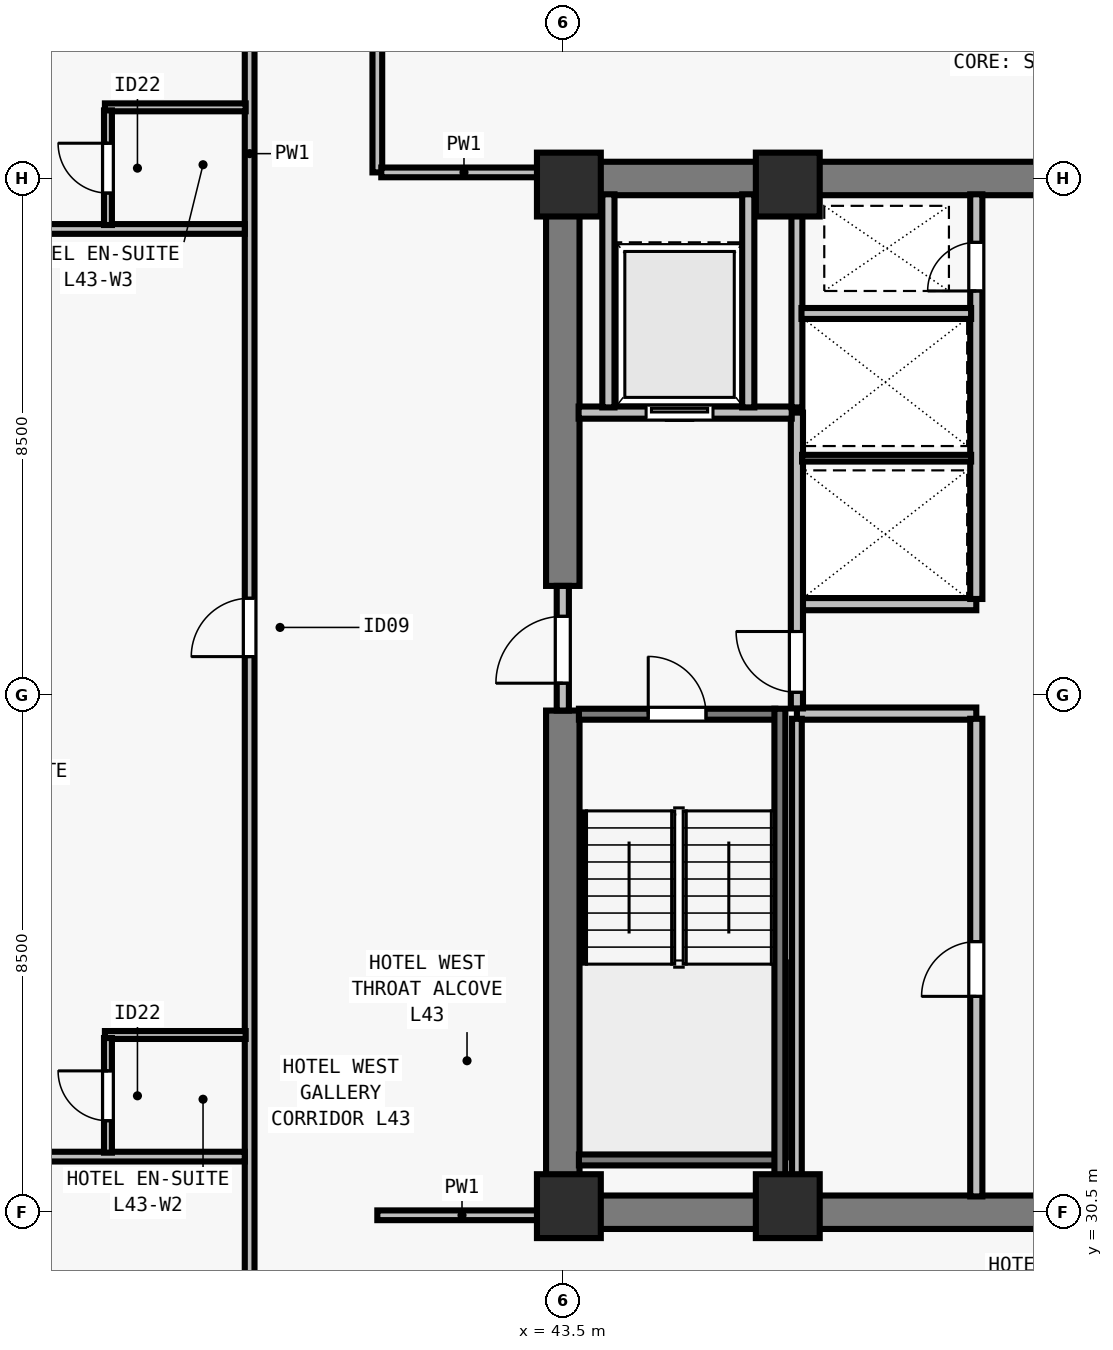
"""IFC4 building model, lengths in metres.
Left out: names, types, materials, properties, quantities, classifications, styles, units other than length and angle.
Written with IfcOpenShell. Run it as: python <this file> out.ifc"""

import sys

from ifc_helpers import new_model, si_unit, direction, frame, frame_2d, origin, origin_2d, place, context, subcontext, project, spatial, rectangle, extrude, element, fill, save


model = new_model("IFC4")
c1 = context("Model", 3, precision=1e-05, world=origin(), true_north=direction((0.0, 1.0)))
c2 = subcontext(c1, "Body", "Model", "MODEL_VIEW")
j1 = project(units=[si_unit("LENGTHUNIT", "METRE"), si_unit("PLANEANGLEUNIT", "RADIAN")], contexts=[c1])
p1 = place(None, origin())
s1 = spatial("IfcSite", under=j1, at=p1, CompositionType="ELEMENT")
p2 = place(p1, origin())
s2 = spatial("IfcBuilding", under=s1, at=p2, CompositionType="ELEMENT")
p3 = place(p2, frame((0.0, 0.0, 158.5)))
s3 = spatial("IfcBuildingStorey", under=s2, at=p3, CompositionType="ELEMENT", Elevation=158.5)
for number, where, z_axis, x_axis in (
    (1, (43.6, 30.6, 0.0), (0.0, 0.0, 1.0), (1.0, 0.0, 0.0)),
    (2, (47.2, 30.6, 0.0), (0.0, 0.0, 1.0), (1.0, 0.0, 0.0)),
    (3, (43.6, 47.4, 0.0), (0.0, 0.0, 1.0), (1.0, 0.0, 0.0)),
    (4, (47.2, 47.4, 0.0), (0.0, 0.0, 1.0), (1.0, 0.0, 0.0)),
):
    element("IfcColumn", number, at=place(p3, frame(where, z_axis=z_axis, x_axis=x_axis)), inside=s3, PredefinedType="COLUMN", context=c2, shape_type="SweptSolid", body=[
        extrude(rectangle(XDim=1.05, YDim=1.05, at=origin_2d()), origin(), (0.0, 0.0, 1.0), 3.5),
    ])
for number, where, z_axis, x_axis in (
    (5, (43.225, 30.5, 0.0), (0.0, 0.0, 1.0), (1.0, 0.0, 0.0)),
    (6, (43.225, 47.5, 0.0), (0.0, 0.0, 1.0), (1.0, 0.0, 0.0)),
):
    element("IfcWall", number, at=place(p3, frame(where, z_axis=z_axis, x_axis=x_axis)), inside=s3, PredefinedType="SHEAR", context=c2, shape_type="SweptSolid", body=[
        extrude(rectangle(XDim=17.55, YDim=0.55, at=frame_2d((8.775, 0.0))), origin(), (0.0, 0.0, 1.0), 3.28),
    ])
p4 = place(p3, frame((43.5, 30.765, 0.0), z_axis=(0.0, 0.0, 1.0), x_axis=(0.0, 1.0, 0.0)))
e7 = element("IfcWall", 7, at=p4, inside=s3, PredefinedType="SHEAR", context=c2, shape_type="SweptSolid", body=[
    extrude(rectangle(XDim=7.985, YDim=0.55, at=frame_2d((3.993, 0.0))), origin(), (0.0, 0.0, 1.0), 3.28),
])
p5 = place(p3, frame((43.5, 40.8, 0.0), z_axis=(0.0, 0.0, 1.0), x_axis=(0.0, 1.0, 0.0)))
e8 = element("IfcWall", 8, at=p5, inside=s3, PredefinedType="SHEAR", context=c2, shape_type="SweptSolid", body=[
    extrude(rectangle(XDim=6.435, YDim=0.55, at=frame_2d((3.218, 0.0))), origin(), (0.0, 0.0, 1.0), 3.28),
])
for number, where, z_axis, x_axis in (
    (9, (47.35, 38.7, 0.0), (0.0, 0.0, 1.0), (1.0, 0.0, 0.0)),
    (10, (47.35, 40.5, 0.0), (0.0, 0.0, 1.0), (1.0, 0.0, 0.0)),
):
    element("IfcWall", number, at=place(p3, frame(where, z_axis=z_axis, x_axis=x_axis)), inside=s3, PredefinedType="SOLIDWALL", context=c2, shape_type="SweptSolid", body=[
        extrude(rectangle(XDim=2.95, YDim=0.2, at=frame_2d((1.475, 0.0))), origin(), (0.0, 0.0, 1.0), 3.28),
    ])
p6 = place(p3, frame((50.3, 30.76, 0.0), z_axis=(0.0, 0.0, 1.0), x_axis=(0.0, 1.0, 0.0)))
e11 = element("IfcWall", 11, at=p6, inside=s3, PredefinedType="SOLIDWALL", context=c2, shape_type="SweptSolid", body=[
    extrude(rectangle(XDim=7.855, YDim=0.2, at=frame_2d((3.927, 0.0))), origin(), (0.0, 0.0, 1.0), 3.28),
])
p7 = place(p6, frame((3.29, 0.0, 0.0)))
e12 = element("IfcOpeningElement", 12, at=p7, cuts=e11, PredefinedType="OPENING", context=c2, shape_type="SweptSolid", body=[
    extrude(rectangle(XDim=0.9, YDim=2.12, at=frame_2d((0.45, 1.06))), frame((0.0, 0.11, 0.0), z_axis=(0.0, -1.0, 0.0), x_axis=(1.0, 0.0, 0.0)), (0.0, 0.0, 1.0), 0.22),
])
p8 = place(p3, frame((50.3, 40.585, 0.0), z_axis=(0.0, 0.0, 1.0), x_axis=(0.0, 1.0, 0.0)))
e13 = element("IfcWall", 13, at=p8, inside=s3, PredefinedType="SOLIDWALL", context=c2, shape_type="SweptSolid", body=[
    extrude(rectangle(XDim=6.655, YDim=0.2, at=frame_2d((3.328, 0.0))), origin(), (0.0, 0.0, 1.0), 3.28),
])
p9 = place(p8, frame((5.065, 0.0, 0.0)))
e14 = element("IfcOpeningElement", 14, at=p9, cuts=e13, PredefinedType="OPENING", context=c2, shape_type="SweptSolid", body=[
    extrude(rectangle(XDim=0.8, YDim=2.08, at=frame_2d((0.4, 1.04))), frame((0.0, 0.11, 0.0), z_axis=(0.0, -1.0, 0.0), x_axis=(1.0, 0.0, 0.0)), (0.0, 0.0, 1.0), 0.22),
])
p10 = place(p3, frame((43.5, 38.75, 0.0), z_axis=(0.0, 0.0, 1.0), x_axis=(0.0, 1.0, 0.0)))
e15 = element("IfcWall", 15, at=p10, inside=s3, PredefinedType="SOLIDWALL", context=c2, shape_type="SweptSolid", body=[
    extrude(rectangle(XDim=2.05, YDim=0.2, at=frame_2d((1.025, 0.0))), origin(), (0.0, 0.0, 1.0), 3.28),
])
p11 = place(p10, frame((0.45, 0.0, 0.0)))
e16 = element("IfcOpeningElement", 16, at=p11, cuts=e15, PredefinedType="OPENING", context=c2, shape_type="SweptSolid", body=[
    extrude(rectangle(XDim=1.1, YDim=2.15, at=frame_2d((0.55, 1.075))), frame((0.0, 0.11, 0.0), z_axis=(0.0, -1.0, 0.0), x_axis=(1.0, 0.0, 0.0)), (0.0, 0.0, 1.0), 0.22),
])
p12 = place(p3, frame((47.35, 38.785, 0.0), z_axis=(0.0, 0.0, 1.0), x_axis=(0.0, 1.0, 0.0)))
e17 = element("IfcWall", 17, at=p12, inside=s3, PredefinedType="SOLIDWALL", context=c2, shape_type="SweptSolid", body=[
    extrude(rectangle(XDim=4.865, YDim=0.2, at=frame_2d((2.433, 0.0))), origin(), (0.0, 0.0, 1.0), 3.28),
])
p13 = place(p12, frame((0.265, 0.0, 0.0)))
e18 = element("IfcOpeningElement", 18, at=p13, cuts=e17, PredefinedType="OPENING", context=c2, shape_type="SweptSolid", body=[
    extrude(rectangle(XDim=1.0, YDim=2.15, at=frame_2d((0.5, 1.075))), frame((0.0, 0.11, 0.0), z_axis=(0.0, -1.0, 0.0), x_axis=(1.0, 0.0, 0.0)), (0.0, 0.0, 1.0), 0.22),
])
p14 = place(p3, frame((43.76, 43.65, 0.0), z_axis=(0.0, 0.0, 1.0), x_axis=(1.0, 0.0, 0.0)))
e19 = element("IfcWall", 19, at=p14, inside=s3, PredefinedType="SOLIDWALL", context=c2, shape_type="SweptSolid", body=[
    extrude(rectangle(XDim=3.505, YDim=0.2, at=frame_2d((1.752, 0.0))), origin(), (0.0, 0.0, 1.0), 3.28),
])
p15 = place(p14, frame((1.11, 0.0, 0.0)))
e20 = element("IfcOpeningElement", 20, at=p15, cuts=e19, PredefinedType="OPENING", context=c2, shape_type="SweptSolid", body=[
    extrude(rectangle(XDim=1.1, YDim=2.2, at=frame_2d((0.55, 1.1))), frame((0.0, 0.11, 0.0), z_axis=(0.0, -1.0, 0.0), x_axis=(1.0, 0.0, 0.0)), (0.0, 0.0, 1.0), 0.22),
])
for number, where, z_axis, x_axis in (
    (21, (46.55, 43.735, 0.0), (0.0, 0.0, 1.0), (0.0, 1.0, 0.0)),
    (22, (44.25, 43.735, 0.0), (0.0, 0.0, 1.0), (0.0, 1.0, 0.0)),
):
    element("IfcWall", number, at=place(p3, frame(where, z_axis=z_axis, x_axis=x_axis)), inside=s3, PredefinedType="SOLIDWALL", context=c2, shape_type="SweptSolid", body=[
        extrude(rectangle(XDim=3.505, YDim=0.2, at=frame_2d((1.752, 0.0))), origin(), (0.0, 0.0, 1.0), 3.28),
    ])
p16 = place(p3, frame((47.35, 30.76, 0.0), z_axis=(0.0, 0.0, 1.0), x_axis=(0.0, 1.0, 0.0)))
e23 = element("IfcWall", 23, at=p16, inside=s3, PredefinedType="PARTITIONING", context=c2, shape_type="SweptSolid", body=[
    extrude(rectangle(XDim=7.855, YDim=0.16, at=frame_2d((3.927, 0.0))), origin(), (0.0, 0.0, 1.0), 3.28),
])
p17 = place(p3, frame((47.35, 43.735, 0.0), z_axis=(0.0, 0.0, 1.0), x_axis=(0.0, 1.0, 0.0)))
e24 = element("IfcWall", 24, at=p17, inside=s3, PredefinedType="SOLIDWALL", context=c2, shape_type="SweptSolid", body=[
    extrude(rectangle(XDim=3.505, YDim=0.18, at=frame_2d((1.752, 0.0))), origin(), (0.0, 0.0, 1.0), 3.28),
])
p18 = place(p3, frame((47.435, 42.9, 0.0), z_axis=(0.0, 0.0, 1.0), x_axis=(1.0, 0.0, 0.0)))
e25 = element("IfcWall", 25, at=p18, inside=s3, PredefinedType="PARTITIONING", context=c2, shape_type="SweptSolid", body=[
    extrude(rectangle(XDim=2.78, YDim=0.11, at=frame_2d((1.39, 0.0))), origin(), (0.0, 0.0, 1.0), 3.28),
])
p19 = place(p3, frame((47.425, 45.28, 0.0), z_axis=(0.0, 0.0, 1.0), x_axis=(1.0, 0.0, 0.0)))
e26 = element("IfcWall", 26, at=p19, inside=s3, PredefinedType="SOLIDWALL", context=c2, shape_type="SweptSolid", body=[
    extrude(rectangle(XDim=2.79, YDim=0.18, at=frame_2d((1.395, 0.0))), origin(), (0.0, 0.0, 1.0), 3.28),
])
p20 = place(p3, frame((38.35, 15.325, 0.0), z_axis=(0.0, 0.0, 1.0), x_axis=(0.0, 1.0, 0.0)))
e27 = element("IfcWall", 27, at=p20, inside=s3, PredefinedType="PARTITIONING", context=c2, shape_type="SweptSolid", body=[
    extrude(rectangle(XDim=47.35, YDim=0.16, at=frame_2d((23.675, 0.0))), origin(), (0.0, 0.0, 1.0), 2.555),
])
p21 = place(p20, frame((8.912, 0.0, 0.0)))
e28 = element("IfcOpeningElement", 28, at=p21, cuts=e27, PredefinedType="OPENING", context=c2, shape_type="SweptSolid", body=[
    extrude(rectangle(XDim=0.96, YDim=2.15, at=frame_2d((0.48, 1.075))), frame((0.0, 0.09, 0.0), z_axis=(0.0, -1.0, 0.0), x_axis=(1.0, 0.0, 0.0)), (0.0, 0.0, 1.0), 0.18),
])
p22 = place(p20, frame((24.312, 0.0, 0.0)))
e29 = element("IfcOpeningElement", 29, at=p22, cuts=e27, PredefinedType="OPENING", context=c2, shape_type="SweptSolid", body=[
    extrude(rectangle(XDim=0.96, YDim=2.15, at=frame_2d((0.48, 1.075))), frame((0.0, 0.09, 0.0), z_axis=(0.0, -1.0, 0.0), x_axis=(1.0, 0.0, 0.0)), (0.0, 0.0, 1.0), 0.18),
])
p23 = place(p20, frame((39.895, 0.0, 0.0)))
e30 = element("IfcOpeningElement", 30, at=p23, cuts=e27, PredefinedType="OPENING", context=c2, shape_type="SweptSolid", body=[
    extrude(rectangle(XDim=0.96, YDim=2.15, at=frame_2d((0.48, 1.075))), frame((0.0, 0.09, 0.0), z_axis=(0.0, -1.0, 0.0), x_axis=(1.0, 0.0, 0.0)), (0.0, 0.0, 1.0), 0.18),
])
p24 = place(p3, frame((40.45, 47.6, 0.0), z_axis=(0.0, 0.0, 1.0), x_axis=(0.0, 1.0, 0.0)))
e31 = element("IfcWall", 31, at=p24, inside=s3, PredefinedType="PARTITIONING", context=c2, shape_type="SweptSolid", body=[
    extrude(rectangle(XDim=15.075, YDim=0.16, at=frame_2d((7.538, 0.0))), origin(), (0.0, 0.0, 1.0), 2.555),
])
p25 = place(p24, frame((3.5, 0.0, 0.0)))
e32 = element("IfcOpeningElement", 32, at=p25, cuts=e31, PredefinedType="OPENING", context=c2, shape_type="SweptSolid", body=[
    extrude(rectangle(XDim=0.96, YDim=2.12, at=frame_2d((0.48, 1.06))), frame((0.0, 0.09, 0.0), z_axis=(0.0, -1.0, 0.0), x_axis=(1.0, 0.0, 0.0)), (0.0, 0.0, 1.0), 0.18),
])
p26 = place(p3, frame((40.45, 30.45, 0.0), z_axis=(0.0, 0.0, 1.0), x_axis=(1.0, 0.0, 0.0)))
e33 = element("IfcWall", 33, at=p26, inside=s3, PredefinedType="PARTITIONING", context=c2, shape_type="SweptSolid", body=[
    extrude(rectangle(XDim=2.785, YDim=0.16, at=frame_2d((1.393, 0.0))), origin(), (0.0, 0.0, 1.0), 3.28),
])
p27 = place(p3, frame((40.515, 47.6, 0.0), z_axis=(0.0, 0.0, 1.0), x_axis=(1.0, 0.0, 0.0)))
e34 = element("IfcWall", 34, at=p27, inside=s3, PredefinedType="PARTITIONING", context=c2, shape_type="SweptSolid", body=[
    extrude(rectangle(XDim=2.72, YDim=0.16, at=frame_2d((1.36, 0.0))), origin(), (0.0, 0.0, 1.0), 3.28),
])
p28 = place(p3, frame((28.325, 31.415, 0.0), z_axis=(0.0, 0.0, 1.0), x_axis=(1.0, 0.0, 0.0)))
e35 = element("IfcWall", 35, at=p28, inside=s3, PredefinedType="PARTITIONING", context=c2, shape_type="SweptSolid", body=[
    extrude(rectangle(XDim=9.945, YDim=0.16, at=frame_2d((4.973, 0.0))), origin(), (0.0, 0.0, 1.0), 3.28),
])
p29 = place(p3, frame((35.97, 33.415, 0.0), z_axis=(0.0, 0.0, 1.0), x_axis=(1.0, 0.0, 0.0)))
e36 = element("IfcWall", 36, at=p29, inside=s3, PredefinedType="PLUMBINGWALL", context=c2, shape_type="SweptSolid", body=[
    extrude(rectangle(XDim=2.315, YDim=0.13, at=frame_2d((1.157, 0.0))), origin(), (0.0, 0.0, 1.0), 3.28),
])
p30 = place(p3, frame((36.02, 31.479, 0.0), z_axis=(0.0, 0.0, 1.0), x_axis=(0.0, 1.0, 0.0)))
e37 = element("IfcWall", 37, at=p30, inside=s3, PredefinedType="PLUMBINGWALL", context=c2, shape_type="SweptSolid", body=[
    extrude(rectangle(XDim=1.885, YDim=0.13, at=frame_2d((0.942, 0.0))), origin(), (0.0, 0.0, 1.0), 3.28),
])
p31 = place(p30, frame((0.525, 0.0, 0.0)))
e38 = element("IfcOpeningElement", 38, at=p31, cuts=e37, PredefinedType="OPENING", context=c2, shape_type="SweptSolid", body=[
    extrude(rectangle(XDim=0.82, YDim=2.1, at=frame_2d((0.41, 1.05))), frame((0.0, 0.075, 0.0), z_axis=(0.0, -1.0, 0.0), x_axis=(1.0, 0.0, 0.0)), (0.0, 0.0, 1.0), 0.15),
])
p32 = place(p3, frame((28.325, 46.67, 0.0), z_axis=(0.0, 0.0, 1.0), x_axis=(1.0, 0.0, 0.0)))
e39 = element("IfcWall", 39, at=p32, inside=s3, PredefinedType="PARTITIONING", context=c2, shape_type="SweptSolid", body=[
    extrude(rectangle(XDim=9.945, YDim=0.16, at=frame_2d((4.973, 0.0))), origin(), (0.0, 0.0, 1.0), 3.28),
])
p33 = place(p3, frame((35.97, 48.67, 0.0), z_axis=(0.0, 0.0, 1.0), x_axis=(1.0, 0.0, 0.0)))
e40 = element("IfcWall", 40, at=p33, inside=s3, PredefinedType="PLUMBINGWALL", context=c2, shape_type="SweptSolid", body=[
    extrude(rectangle(XDim=2.315, YDim=0.13, at=frame_2d((1.157, 0.0))), origin(), (0.0, 0.0, 1.0), 3.28),
])
p34 = place(p3, frame((36.02, 46.735, 0.0), z_axis=(0.0, 0.0, 1.0), x_axis=(0.0, 1.0, 0.0)))
e41 = element("IfcWall", 41, at=p34, inside=s3, PredefinedType="PLUMBINGWALL", context=c2, shape_type="SweptSolid", body=[
    extrude(rectangle(XDim=1.885, YDim=0.13, at=frame_2d((0.942, 0.0))), origin(), (0.0, 0.0, 1.0), 3.28),
])
p35 = place(p34, frame((0.525, 0.0, 0.0)))
e42 = element("IfcOpeningElement", 42, at=p35, cuts=e41, PredefinedType="OPENING", context=c2, shape_type="SweptSolid", body=[
    extrude(rectangle(XDim=0.82, YDim=2.1, at=frame_2d((0.41, 1.05))), frame((0.0, 0.075, 0.0), z_axis=(0.0, -1.0, 0.0), x_axis=(1.0, 0.0, 0.0)), (0.0, 0.0, 1.0), 0.15),
])
p36 = place(p3, frame((43.765, 38.69, 0.0), z_axis=(0.0, 0.0, 1.0), x_axis=(1.0, 0.0, 0.0)))
e43 = element("IfcWall", 43, at=p36, inside=s3, PredefinedType="SOLIDWALL", context=c2, shape_type="SweptSolid", body=[
    extrude(rectangle(XDim=3.23, YDim=0.18, at=frame_2d((1.615, 0.0))), origin(), (0.0, 0.0, 1.0), 3.28),
])
p37 = place(p36, frame((1.14, 0.0, 0.0)))
e44 = element("IfcOpeningElement", 44, at=p37, cuts=e43, PredefinedType="OPENING", context=c2, shape_type="SweptSolid", body=[
    extrude(rectangle(XDim=0.95, YDim=2.15, at=frame_2d((0.475, 1.075))), frame((0.0, 0.1, 0.0), z_axis=(0.0, -1.0, 0.0), x_axis=(1.0, 0.0, 0.0)), (0.0, 0.0, 1.0), 0.2),
])
p38 = place(p3, frame((43.765, 31.36, 0.0), z_axis=(0.0, 0.0, 1.0), x_axis=(1.0, 0.0, 0.0)))
e45 = element("IfcWall", 45, at=p38, inside=s3, PredefinedType="SOLIDWALL", context=c2, shape_type="SweptSolid", body=[
    extrude(rectangle(XDim=3.23, YDim=0.18, at=frame_2d((1.615, 0.0))), origin(), (0.0, 0.0, 1.0), 3.28),
])
p39 = place(p3, frame((47.07, 38.78, 0.0), z_axis=(0.0, 0.0, 1.0), x_axis=(0.0, -1.0, 0.0)))
e46 = element("IfcWall", 46, at=p39, inside=s3, PredefinedType="SOLIDWALL", context=c2, shape_type="SweptSolid", body=[
    extrude(rectangle(XDim=8.017, YDim=0.18, at=frame_2d((4.009, 0.0))), origin(), (0.0, 0.0, 1.0), 3.28),
])
p40 = place(p11, origin())
e47 = element("IfcDoor", 47, at=p40, inside=s3, OperationType="SINGLE_SWING_LEFT", PredefinedType="DOOR", context=c2, shape_type="SweptSolid", body=[
    extrude(rectangle(XDim=1.1, YDim=2.15, at=frame_2d((0.55, 1.075))), frame((0.0, 0.025, 0.0), z_axis=(0.0, -1.0, 0.0), x_axis=(1.0, 0.0, 0.0)), (0.0, 0.0, 1.0), 0.05),
])
fill(e16, e47)
p41 = place(p13, origin())
e48 = element("IfcDoor", 48, at=p41, inside=s3, OperationType="SINGLE_SWING_RIGHT", PredefinedType="DOOR", context=c2, shape_type="SweptSolid", body=[
    extrude(rectangle(XDim=1.0, YDim=2.15, at=frame_2d((0.5, 1.075))), frame((0.0, 0.025, 0.0), z_axis=(0.0, -1.0, 0.0), x_axis=(1.0, 0.0, 0.0)), (0.0, 0.0, 1.0), 0.05),
])
fill(e18, e48)
p42 = place(p15, origin())
e49 = element("IfcDoor", 49, at=p42, inside=s3, OperationType="SLIDING_TO_LEFT", PredefinedType="DOOR", context=c2, shape_type="SweptSolid", body=[
    extrude(rectangle(XDim=1.1, YDim=2.2, at=frame_2d((0.55, 1.1))), frame((0.0, 0.025, 0.0), z_axis=(0.0, -1.0, 0.0), x_axis=(1.0, 0.0, 0.0)), (0.0, 0.0, 1.0), 0.05),
])
fill(e20, e49)
p43 = place(p7, origin())
e50 = element("IfcDoor", 50, at=p43, inside=s3, OperationType="SINGLE_SWING_LEFT", PredefinedType="DOOR", context=c2, shape_type="SweptSolid", body=[
    extrude(rectangle(XDim=0.9, YDim=2.12, at=frame_2d((0.45, 1.06))), frame((0.0, 0.025, 0.0), z_axis=(0.0, -1.0, 0.0), x_axis=(1.0, 0.0, 0.0)), (0.0, 0.0, 1.0), 0.05),
])
fill(e12, e50)
p44 = place(p9, origin())
e51 = element("IfcDoor", 51, at=p44, inside=s3, OperationType="SINGLE_SWING_LEFT", PredefinedType="DOOR", context=c2, shape_type="SweptSolid", body=[
    extrude(rectangle(XDim=0.8, YDim=2.08, at=frame_2d((0.4, 1.04))), frame((0.0, 0.025, 0.0), z_axis=(0.0, -1.0, 0.0), x_axis=(1.0, 0.0, 0.0)), (0.0, 0.0, 1.0), 0.05),
])
fill(e14, e51)
p45 = place(p31, origin())
e52 = element("IfcDoor", 52, at=p45, inside=s3, OperationType="SINGLE_SWING_RIGHT", PredefinedType="DOOR", context=c2, shape_type="SweptSolid", body=[
    extrude(rectangle(XDim=0.82, YDim=2.1, at=frame_2d((0.41, 1.05))), frame((0.0, 0.025, 0.0), z_axis=(0.0, -1.0, 0.0), x_axis=(1.0, 0.0, 0.0)), (0.0, 0.0, 1.0), 0.05),
])
fill(e38, e52)
p46 = place(p22, origin())
e53 = element("IfcDoor", 53, at=p46, inside=s3, OperationType="SINGLE_SWING_LEFT", PredefinedType="DOOR", context=c2, shape_type="SweptSolid", body=[
    extrude(rectangle(XDim=0.96, YDim=2.15, at=frame_2d((0.48, 1.075))), frame((0.0, 0.025, 0.0), z_axis=(0.0, -1.0, 0.0), x_axis=(1.0, 0.0, 0.0)), (0.0, 0.0, 1.0), 0.05),
])
fill(e29, e53)
p47 = place(p35, origin())
e54 = element("IfcDoor", 54, at=p47, inside=s3, OperationType="SINGLE_SWING_RIGHT", PredefinedType="DOOR", context=c2, shape_type="SweptSolid", body=[
    extrude(rectangle(XDim=0.82, YDim=2.1, at=frame_2d((0.41, 1.05))), frame((0.0, 0.025, 0.0), z_axis=(0.0, -1.0, 0.0), x_axis=(1.0, 0.0, 0.0)), (0.0, 0.0, 1.0), 0.05),
])
fill(e42, e54)
p48 = place(p37, origin())
e55 = element("IfcDoor", 55, at=p48, inside=s3, OperationType="SINGLE_SWING_LEFT", PredefinedType="DOOR", context=c2, shape_type="SweptSolid", body=[
    extrude(rectangle(XDim=0.95, YDim=2.15, at=frame_2d((0.475, 1.075))), frame((0.0, 0.025, 0.0), z_axis=(0.0, -1.0, 0.0), x_axis=(1.0, 0.0, 0.0)), (0.0, 0.0, 1.0), 0.05),
])
fill(e44, e55)
save(model, sys.argv[1])
